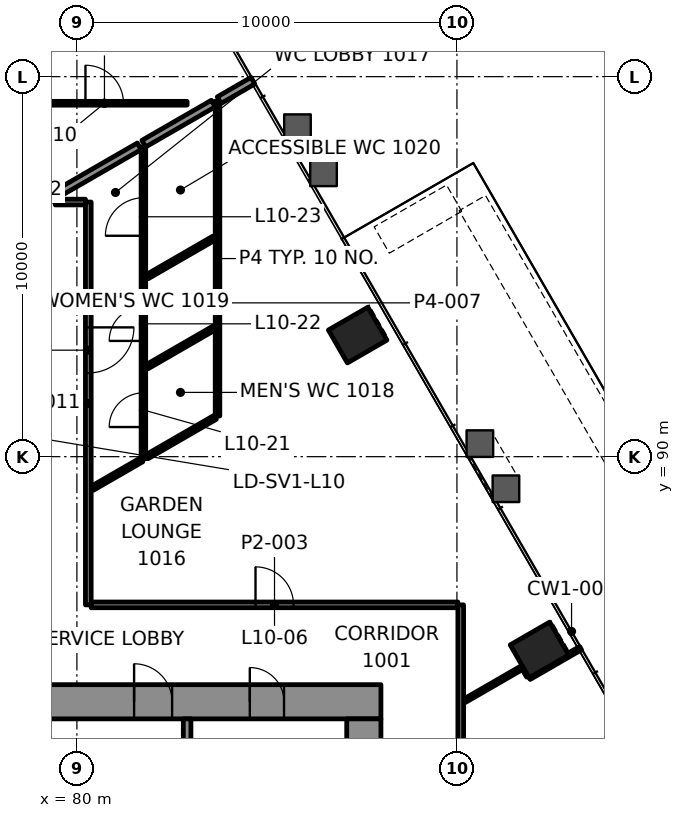
"""IFC4 building model, lengths in metres.
Left out: names, types, materials, properties, quantities, classifications, styles, units other than length and angle.
Written with IfcOpenShell. Run it as: python <this file> out.ifc"""

import sys

from ifc_helpers import new_model, si_unit, direction, frame, frame_2d, origin, origin_2d, place, context, subcontext, project, spatial, rectangle, extrude, element, fill, save


model = new_model("IFC4")
c1 = context("Model", 3, precision=1e-05, world=origin(), true_north=direction((0.0, 1.0)))
c2 = subcontext(c1, "Body", "Model", "MODEL_VIEW")
j1 = project(units=[si_unit("LENGTHUNIT", "METRE"), si_unit("PLANEANGLEUNIT", "RADIAN")], contexts=[c1])
p1 = place(None, origin())
s1 = spatial("IfcSite", under=j1, at=p1, CompositionType="ELEMENT")
p2 = place(p1, origin())
s2 = spatial("IfcBuilding", under=s1, at=p2, CompositionType="ELEMENT")
p3 = place(p2, frame((0.0, 0.0, 48.4)))
s3 = spatial("IfcBuildingStorey", under=s2, at=p3, CompositionType="ELEMENT", Elevation=48.4)
for number, where, z_axis, x_axis in (
    (1, (92.171, 84.914, -0.0), (0.0, 0.0, 1.0), (-0.5, 0.866, 0.0)),
    (2, (87.388, 93.199, -0.0), (0.0, 0.0, 1.0), (-0.5, 0.866, 0.0)),
):
    element("IfcColumn", number, at=place(p3, frame(where, z_axis=z_axis, x_axis=x_axis)), inside=s3, PredefinedType="COLUMN", context=c2, shape_type="SweptSolid", body=[
        extrude(rectangle(XDim=1.0, YDim=1.2, at=origin_2d()), origin(), (0.0, 0.0, 1.0), 4.2),
    ])
p4 = place(p3, frame((62.9, 83.55, 0.0), z_axis=(0.0, 0.0, 1.0), x_axis=(1.0, 0.0, 0.0)))
e3 = element("IfcWall", 3, at=p4, inside=s3, PredefinedType="SHEAR", context=c2, shape_type="SweptSolid", body=[
    extrude(rectangle(XDim=25.1, YDim=0.9, at=frame_2d((12.55, 0.0))), origin(), (0.0, 0.0, 1.0), 4.0),
])
p5 = place(p4, frame((4.795, 0.0, 0.0)))
e4 = element("IfcOpeningElement", 4, at=p5, cuts=e3, PredefinedType="OPENING", context=c2, shape_type="SweptSolid", body=[
    extrude(rectangle(XDim=1.0, YDim=2.1, at=frame_2d((0.5, 1.05))), frame((0.0, 0.46, 0.0), z_axis=(0.0, -1.0, 0.0), x_axis=(1.0, 0.0, 0.0)), (0.0, 0.0, 1.0), 0.92),
])
p6 = place(p4, frame((18.605, 0.0, 0.0)))
e5 = element("IfcOpeningElement", 5, at=p6, cuts=e3, PredefinedType="OPENING", context=c2, shape_type="SweptSolid", body=[
    extrude(rectangle(XDim=1.0, YDim=2.1, at=frame_2d((0.5, 1.05))), frame((0.0, 0.46, 0.0), z_axis=(0.0, -1.0, 0.0), x_axis=(1.0, 0.0, 0.0)), (0.0, 0.0, 1.0), 0.92),
])
p7 = place(p4, frame((2.55, 0.0, 0.0)))
e6 = element("IfcOpeningElement", 6, at=p7, cuts=e3, PredefinedType="OPENING", context=c2, shape_type="SweptSolid", body=[
    extrude(rectangle(XDim=0.9, YDim=2.1, at=frame_2d((0.45, 1.05))), frame((0.0, 0.46, 0.0), z_axis=(0.0, -1.0, 0.0), x_axis=(1.0, 0.0, 0.0)), (0.0, 0.0, 1.0), 0.92),
])
p8 = place(p4, frame((11.75, 0.0, 0.0)))
e7 = element("IfcOpeningElement", 7, at=p8, cuts=e3, PredefinedType="OPENING", context=c2, shape_type="SweptSolid", body=[
    extrude(rectangle(XDim=0.9, YDim=2.1, at=frame_2d((0.45, 1.05))), frame((0.0, 0.46, 0.0), z_axis=(0.0, -1.0, 0.0), x_axis=(1.0, 0.0, 0.0)), (0.0, 0.0, 1.0), 0.92),
])
p9 = place(p4, frame((21.65, 0.0, 0.0)))
e8 = element("IfcOpeningElement", 8, at=p9, cuts=e3, PredefinedType="OPENING", context=c2, shape_type="SweptSolid", body=[
    extrude(rectangle(XDim=0.9, YDim=2.1, at=frame_2d((0.45, 1.05))), frame((0.0, 0.46, 0.0), z_axis=(0.0, -1.0, 0.0), x_axis=(1.0, 0.0, 0.0)), (0.0, 0.0, 1.0), 0.92),
])
p10 = place(p3, frame((87.55, 66.9, 0.0), z_axis=(0.0, 0.0, 1.0), x_axis=(0.0, 1.0, 0.0)))
e9 = element("IfcWall", 9, at=p10, inside=s3, PredefinedType="SHEAR", context=c2, shape_type="SweptSolid", body=[
    extrude(rectangle(XDim=16.2, YDim=0.9, at=frame_2d((8.1, 0.0))), origin(), (0.0, 0.0, 1.0), 4.0),
])
p11 = place(p10, frame((5.5, 0.0, 0.0)))
e10 = element("IfcOpeningElement", 10, at=p11, cuts=e9, PredefinedType="OPENING", context=c2, shape_type="SweptSolid", body=[
    extrude(rectangle(XDim=1.8, YDim=2.1, at=frame_2d((0.9, 1.05))), frame((0.0, 0.46, 0.0), z_axis=(0.0, -1.0, 0.0), x_axis=(1.0, 0.0, 0.0)), (0.0, 0.0, 1.0), 0.92),
])
p12 = place(p10, frame((11.738, 0.0, 0.0)))
e11 = element("IfcOpeningElement", 11, at=p12, cuts=e9, PredefinedType="OPENING", context=c2, shape_type="SweptSolid", body=[
    extrude(rectangle(XDim=0.9, YDim=2.1, at=frame_2d((0.45, 1.05))), frame((0.0, 0.46, 0.0), z_axis=(0.0, -1.0, 0.0), x_axis=(1.0, 0.0, 0.0)), (0.0, 0.0, 1.0), 0.92),
])
p13 = place(p3, frame((80.375, 86.1, 0.0), z_axis=(0.0, 0.0, 1.0), x_axis=(1.0, 0.0, 0.0)))
e12 = element("IfcWall", 12, at=p13, inside=s3, PredefinedType="PARTITIONING", context=c2, shape_type="SweptSolid", body=[
    extrude(rectangle(XDim=9.649, YDim=0.15, at=frame_2d((4.825, 0.0))), origin(), (0.0, 0.0, 1.0), 3.4),
])
p14 = place(p13, frame((4.325, 0.0, 0.0)))
e13 = element("IfcOpeningElement", 13, at=p14, cuts=e12, PredefinedType="OPENING", context=c2, shape_type="SweptSolid", body=[
    extrude(rectangle(XDim=1.0, YDim=2.1, at=frame_2d((0.5, 1.05))), frame((0.0, 0.085, 0.0), z_axis=(0.0, -1.0, 0.0), x_axis=(1.0, 0.0, 0.0)), (0.0, 0.0, 1.0), 0.17),
])
p15 = place(p3, frame((78.551, 99.3, 0.0), z_axis=(0.0, 0.0, 1.0), x_axis=(1.0, 0.0, 0.0)))
e14 = element("IfcWall", 14, at=p15, inside=s3, PredefinedType="PARTITIONING", context=c2, shape_type="SweptSolid", body=[
    extrude(rectangle(XDim=4.349, YDim=0.1, at=frame_2d((2.175, 0.0))), origin(), (0.0, 0.0, 1.0), 3.4),
])
p16 = place(p15, frame((1.675, 0.0, 0.0)))
e15 = element("IfcOpeningElement", 15, at=p16, cuts=e14, PredefinedType="OPENING", context=c2, shape_type="SweptSolid", body=[
    extrude(rectangle(XDim=1.0, YDim=2.1, at=frame_2d((0.5, 1.05))), frame((0.0, 0.06, 0.0), z_axis=(0.0, -1.0, 0.0), x_axis=(1.0, 0.0, 0.0)), (0.0, 0.0, 1.0), 0.12),
])
p17 = place(p3, frame((91.902, 84.181, 0.0), z_axis=(0.0, 0.0, 1.0), x_axis=(0.866018739521, 0.500011542666, 0.0)))
e16 = element("IfcWall", 16, at=p17, inside=s3, PredefinedType="PARTITIONING", context=c2, shape_type="SweptSolid", body=[
    extrude(rectangle(XDim=1.56, YDim=0.1, at=frame_2d((0.78, 0.0))), origin(), (0.0, 0.0, 1.0), 3.165),
])
p18 = place(p3, frame((90.201, 83.577, 0.0), z_axis=(0.0, 0.0, 1.0), x_axis=(0.866016025414, 0.500016243463, 0.0)))
e17 = element("IfcWall", 17, at=p18, inside=s3, PredefinedType="PARTITIONING", context=c2, shape_type="SweptSolid", body=[
    extrude(rectangle(XDim=1.774, YDim=0.1, at=frame_2d((0.887, 0.0))), origin(), (0.0, 0.0, 1.0), 3.4),
])
p19 = place(p3, frame((80.41, 89.17, 0.0), z_axis=(0.0, 0.0, 1.0), x_axis=(0.866055123991, 0.49994851956, 0.0)))
e18 = element("IfcWall", 18, at=p19, inside=s3, PredefinedType="PARTITIONING", context=c2, shape_type="SweptSolid", body=[
    extrude(rectangle(XDim=1.496, YDim=0.12, at=frame_2d((0.748, 0.0))), origin(), (0.0, 0.0, 1.0), 3.4),
])
p20 = place(p3, frame((81.845, 92.366, 0.0), z_axis=(0.0, 0.0, 1.0), x_axis=(0.866069607179, 0.499923429657, 0.0)))
e19 = element("IfcWall", 19, at=p20, inside=s3, PredefinedType="PARTITIONING", context=c2, shape_type="SweptSolid", body=[
    extrude(rectangle(XDim=2.033, YDim=0.12, at=frame_2d((1.017, 0.0))), origin(), (0.0, 0.0, 1.0), 3.4),
])
p21 = place(p3, frame((81.845, 94.733, 0.0), z_axis=(0.0, 0.0, 1.0), x_axis=(0.866017611601, 0.500013496215, 0.0)))
e20 = element("IfcWall", 20, at=p21, inside=s3, PredefinedType="PARTITIONING", context=c2, shape_type="SweptSolid", body=[
    extrude(rectangle(XDim=2.033, YDim=0.12, at=frame_2d((1.017, 0.0))), origin(), (0.0, 0.0, 1.0), 3.4),
])
p22 = place(p3, frame((79.1, 96.7, 0.0), z_axis=(0.0, 0.0, 1.0), x_axis=(0.866031706645, 0.499989082967, 0.0)))
e21 = element("IfcWall", 21, at=p22, inside=s3, PredefinedType="PARTITIONING", context=c2, shape_type="SweptSolid", body=[
    extrude(rectangle(XDim=2.933, YDim=0.2, at=frame_2d((1.466, 0.0))), origin(), (0.0, 0.0, 1.0), 3.4),
])
p23 = place(p3, frame((90.1, 86.1, 0.0), z_axis=(0.0, 0.0, 1.0), x_axis=(0.0, -1.0, 0.0)))
e22 = element("IfcWall", 22, at=p23, inside=s3, PredefinedType="PARTITIONING", context=c2, shape_type="SweptSolid", body=[
    extrude(rectangle(XDim=18.778, YDim=0.15, at=frame_2d((9.389, 0.0))), origin(), (0.0, 0.0, 1.0), 3.4),
])
p24 = place(p23, frame((7.704, 0.0, 0.0)))
e23 = element("IfcOpeningElement", 23, at=p24, cuts=e22, PredefinedType="OPENING", context=c2, shape_type="SweptSolid", body=[
    extrude(rectangle(XDim=1.0, YDim=2.1, at=frame_2d((0.5, 1.05))), frame((0.0, 0.085, 0.0), z_axis=(0.0, -1.0, 0.0), x_axis=(1.0, 0.0, 0.0)), (0.0, 0.0, 1.0), 0.17),
])
p25 = place(p23, frame((15.701, 0.0, 0.0)))
e24 = element("IfcOpeningElement", 24, at=p25, cuts=e22, PredefinedType="OPENING", context=c2, shape_type="SweptSolid", body=[
    extrude(rectangle(XDim=1.0, YDim=2.1, at=frame_2d((0.5, 1.05))), frame((0.0, 0.085, 0.0), z_axis=(0.0, -1.0, 0.0), x_axis=(1.0, 0.0, 0.0)), (0.0, 0.0, 1.0), 0.17),
])
p26 = place(p3, frame((83.7, 91.07, 0.0), z_axis=(0.0, 0.0, 1.0), x_axis=(0.0, 1.0, 0.0)))
e25 = element("IfcWall", 25, at=p26, inside=s3, PredefinedType="PARTITIONING", context=c2, shape_type="SweptSolid", body=[
    extrude(rectangle(XDim=8.285, YDim=0.12, at=frame_2d((4.143, 0.0))), origin(), (0.0, 0.0, 1.0), 3.165),
])
p27 = place(p3, frame((81.75, 89.944, 0.0), z_axis=(0.0, 0.0, 1.0), x_axis=(0.0, 1.0, 0.0)))
e26 = element("IfcWall", 26, at=p27, inside=s3, PredefinedType="PARTITIONING", context=c2, shape_type="SweptSolid", body=[
    extrude(rectangle(XDim=8.206, YDim=0.12, at=frame_2d((4.103, 0.0))), origin(), (0.0, 0.0, 1.0), 3.4),
])
p28 = place(p27, frame((0.835, 0.0, 0.0)))
e27 = element("IfcOpeningElement", 27, at=p28, cuts=e26, PredefinedType="OPENING", context=c2, shape_type="SweptSolid", body=[
    extrude(rectangle(XDim=0.9, YDim=2.1, at=frame_2d((0.45, 1.05))), frame((0.0, 0.07, 0.0), z_axis=(0.0, -1.0, 0.0), x_axis=(1.0, 0.0, 0.0)), (0.0, 0.0, 1.0), 0.14),
])
p29 = place(p27, frame((3.101, 0.0, 0.0)))
e28 = element("IfcOpeningElement", 28, at=p29, cuts=e26, PredefinedType="OPENING", context=c2, shape_type="SweptSolid", body=[
    extrude(rectangle(XDim=0.9, YDim=2.1, at=frame_2d((0.45, 1.05))), frame((0.0, 0.07, 0.0), z_axis=(0.0, -1.0, 0.0), x_axis=(1.0, 0.0, 0.0)), (0.0, 0.0, 1.0), 0.14),
])
p30 = place(p27, frame((5.869, 0.0, 0.0)))
e29 = element("IfcOpeningElement", 29, at=p30, cuts=e26, PredefinedType="OPENING", context=c2, shape_type="SweptSolid", body=[
    extrude(rectangle(XDim=1.0, YDim=2.1, at=frame_2d((0.5, 1.05))), frame((0.0, 0.07, 0.0), z_axis=(0.0, -1.0, 0.0), x_axis=(1.0, 0.0, 0.0)), (0.0, 0.0, 1.0), 0.14),
])
p31 = place(p3, frame((80.3, 96.7, 0.0), z_axis=(0.0, 0.0, 1.0), x_axis=(0.0, -1.0, 0.0)))
e30 = element("IfcWall", 30, at=p31, inside=s3, PredefinedType="PARTITIONING", context=c2, shape_type="SweptSolid", body=[
    extrude(rectangle(XDim=10.6, YDim=0.15, at=frame_2d((5.3, 0.0))), origin(), (0.0, 0.0, 1.0), 3.4),
])
p32 = place(p31, frame((3.298, 0.0, 0.0)))
e31 = element("IfcOpeningElement", 31, at=p32, cuts=e30, PredefinedType="OPENING", context=c2, shape_type="SweptSolid", body=[
    extrude(rectangle(XDim=1.2, YDim=2.1, at=frame_2d((0.6, 1.05))), frame((0.0, 0.085, 0.0), z_axis=(0.0, -1.0, 0.0), x_axis=(1.0, 0.0, 0.0)), (0.0, 0.0, 1.0), 0.17),
])
p33 = place(p3, frame((91.877, 84.225, 0.0), z_axis=(0.0, 0.0, 1.0), x_axis=(-0.500313526201, 0.865844313662, 0.0)))
e32 = element("IfcWall", 32, at=p33, inside=s3, PredefinedType="PARTITIONING", context=c2, shape_type="SweptSolid", body=[
    extrude(rectangle(XDim=0.226, YDim=0.1, at=frame_2d((0.113, 0.0))), origin(), (0.0, 0.0, 1.0), 3.4),
])
p34 = place(p3, frame((79.429, 96.7, 0.0), z_axis=(0.0, 0.0, 1.0), x_axis=(1.0, 0.0, 0.0)))
e33 = element("IfcWall", 33, at=p34, inside=s3, PredefinedType="PARTITIONING", context=c2, shape_type="SweptSolid", body=[
    extrude(rectangle(XDim=0.796, YDim=0.15, at=frame_2d((0.398, 0.0))), origin(), (0.0, 0.0, 1.0), 3.4),
])
p35 = place(p3, frame((81.84, 89.996, 0.0), z_axis=(0.0, 0.0, 1.0), x_axis=(0.866015411258, 0.500017307165, 0.0)))
e34 = element("IfcWall", 34, at=p35, inside=s3, PredefinedType="PARTITIONING", context=c2, shape_type="SweptSolid", body=[
    extrude(rectangle(XDim=2.079, YDim=0.12, at=frame_2d((1.039, 0.0))), origin(), (0.0, 0.0, 1.0), 3.4),
])
p36 = place(p3, frame((83.745, 99.382, 0.0), z_axis=(0.0, 0.0, 1.0), x_axis=(0.866062461731, 0.499935808259, 0.0)))
e35 = element("IfcWall", 35, at=p36, inside=s3, PredefinedType="PARTITIONING", context=c2, shape_type="SweptSolid", body=[
    extrude(rectangle(XDim=1.024, YDim=0.2, at=frame_2d((0.512, 0.0))), origin(), (0.0, 0.0, 1.0), 3.165),
])
p37 = place(p3, frame((81.76, 98.236, 0.0), z_axis=(0.0, 0.0, 1.0), x_axis=(0.866037425094, 0.499979177903, 0.0)))
e36 = element("IfcWall", 36, at=p37, inside=s3, PredefinedType="PARTITIONING", context=c2, shape_type="SweptSolid", body=[
    extrude(rectangle(XDim=2.113, YDim=0.2, at=frame_2d((1.056, 0.0))), origin(), (0.0, 0.0, 1.0), 3.4),
])
p38 = place(p3, frame((110.994, 61.012, 0.0), z_axis=(0.0, 0.0, 1.0), x_axis=(-0.500000104629, 0.866025343377, 0.0)))
e37 = element("IfcWall", 37, at=p38, inside=s3, PredefinedType="SOLIDWALL", context=c2, shape_type="SweptSolid", body=[
    extrude(rectangle(XDim=41.178, YDim=0.8, at=frame_2d((20.589, 0.0))), origin(), (0.0, 0.0, 1.0), 0.9),
])
p39 = place(p3, frame((89.927, 96.802, 0.0), z_axis=(0.0, 0.0, 1.0), x_axis=(-0.866008176907, -0.50002983664, 0.0)))
e38 = element("IfcWall", 38, at=p39, inside=s3, PredefinedType="SOLIDWALL", context=c2, shape_type="SweptSolid", body=[
    extrude(rectangle(XDim=2.2, YDim=0.8, at=frame_2d((1.1, 0.0))), origin(), (0.0, 0.0, 1.0), 0.9),
])
p40 = place(p3, frame((82.9, 81.28, 0.0), z_axis=(0.0, 0.0, 1.0), x_axis=(0.0, 1.0, 0.0)))
e39 = element("IfcWall", 39, at=p40, inside=s3, PredefinedType="PARTITIONING", context=c2, shape_type="SweptSolid", body=[
    extrude(rectangle(XDim=1.82, YDim=0.2, at=frame_2d((0.91, 0.0))), origin(), (0.0, 0.0, 1.0), 4.0),
])
p41 = place(p14, origin())
e40 = element("IfcDoor", 40, at=p41, inside=s3, OperationType="SINGLE_SWING_LEFT", PredefinedType="DOOR", context=c2, shape_type="SweptSolid", body=[
    extrude(rectangle(XDim=1.0, YDim=2.1, at=frame_2d((0.5, 1.05))), frame((0.0, 0.025, 0.0), z_axis=(0.0, -1.0, 0.0), x_axis=(1.0, 0.0, 0.0)), (0.0, 0.0, 1.0), 0.05),
])
fill(e13, e40)
p42 = place(p16, origin())
e41 = element("IfcDoor", 41, at=p42, inside=s3, OperationType="SINGLE_SWING_RIGHT", PredefinedType="DOOR", context=c2, shape_type="SweptSolid", body=[
    extrude(rectangle(XDim=1.0, YDim=2.1, at=frame_2d((0.5, 1.05))), frame((0.0, 0.025, 0.0), z_axis=(0.0, -1.0, 0.0), x_axis=(1.0, 0.0, 0.0)), (0.0, 0.0, 1.0), 0.05),
])
fill(e15, e41)
p43 = place(p28, origin())
e42 = element("IfcDoor", 42, at=p43, inside=s3, OperationType="SINGLE_SWING_LEFT", PredefinedType="DOOR", context=c2, shape_type="SweptSolid", body=[
    extrude(rectangle(XDim=0.9, YDim=2.1, at=frame_2d((0.45, 1.05))), frame((0.0, 0.025, 0.0), z_axis=(0.0, -1.0, 0.0), x_axis=(1.0, 0.0, 0.0)), (0.0, 0.0, 1.0), 0.05),
])
fill(e27, e42)
p44 = place(p29, origin())
e43 = element("IfcDoor", 43, at=p44, inside=s3, OperationType="SINGLE_SWING_RIGHT", PredefinedType="DOOR", context=c2, shape_type="SweptSolid", body=[
    extrude(rectangle(XDim=0.9, YDim=2.1, at=frame_2d((0.45, 1.05))), frame((0.0, 0.025, 0.0), z_axis=(0.0, -1.0, 0.0), x_axis=(1.0, 0.0, 0.0)), (0.0, 0.0, 1.0), 0.05),
])
fill(e28, e43)
p45 = place(p30, origin())
e44 = element("IfcDoor", 44, at=p45, inside=s3, OperationType="SINGLE_SWING_LEFT", PredefinedType="DOOR", context=c2, shape_type="SweptSolid", body=[
    extrude(rectangle(XDim=1.0, YDim=2.1, at=frame_2d((0.5, 1.05))), frame((0.0, 0.025, 0.0), z_axis=(0.0, -1.0, 0.0), x_axis=(1.0, 0.0, 0.0)), (0.0, 0.0, 1.0), 0.05),
])
fill(e29, e44)
p46 = place(p32, origin())
e45 = element("IfcDoor", 45, at=p46, inside=s3, OperationType="DOUBLE_DOOR_SINGLE_SWING", PredefinedType="DOOR", context=c2, shape_type="SweptSolid", body=[
    extrude(rectangle(XDim=1.2, YDim=2.1, at=frame_2d((0.6, 1.05))), frame((0.0, 0.025, 0.0), z_axis=(0.0, -1.0, 0.0), x_axis=(1.0, 0.0, 0.0)), (0.0, 0.0, 1.0), 0.05),
])
fill(e31, e45)
p47 = place(p6, origin())
e46 = element("IfcDoor", 46, at=p47, inside=s3, OperationType="SINGLE_SWING_LEFT", PredefinedType="DOOR", context=c2, shape_type="SweptSolid", body=[
    extrude(rectangle(XDim=1.0, YDim=2.1, at=frame_2d((0.5, 1.05))), frame((0.0, 0.17, 0.0), z_axis=(0.0, -1.0, 0.0), x_axis=(1.0, 0.0, 0.0)), (0.0, 0.0, 1.0), 0.34),
])
fill(e5, e46)
p48 = place(p9, origin())
e47 = element("IfcDoor", 47, at=p48, inside=s3, OperationType="SINGLE_SWING_LEFT", PredefinedType="DOOR", context=c2, shape_type="SweptSolid", body=[
    extrude(rectangle(XDim=0.9, YDim=2.1, at=frame_2d((0.45, 1.05))), frame((0.0, 0.17, 0.0), z_axis=(0.0, -1.0, 0.0), x_axis=(1.0, 0.0, 0.0)), (0.0, 0.0, 1.0), 0.34),
])
fill(e8, e47)
save(model, sys.argv[1])
